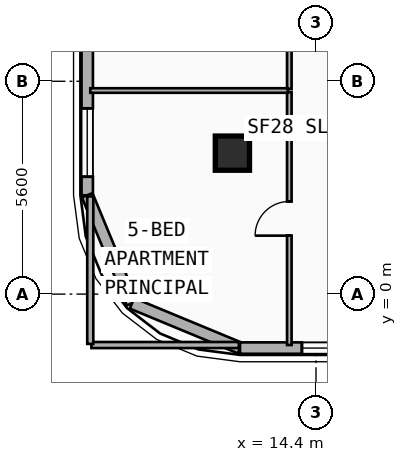
"""IFC4 building model, lengths in metres.
Left out: names, types, materials, properties, quantities, classifications, styles, units other than length and angle.
Written with IfcOpenShell. Run it as: python <this file> out.ifc"""

import sys

from ifc_helpers import new_model, si_unit, direction, frame, frame_2d, origin, origin_2d, place, context, subcontext, project, spatial, rectangle, extrude, element, fill, save


model = new_model("IFC4")
c1 = context("Model", 3, precision=1e-05, world=origin(), true_north=direction((0.0, 1.0)))
c2 = subcontext(c1, "Body", "Model", "MODEL_VIEW")
j1 = project(units=[si_unit("LENGTHUNIT", "METRE"), si_unit("PLANEANGLEUNIT", "RADIAN")], contexts=[c1])
p1 = place(None, origin())
s1 = spatial("IfcSite", under=j1, at=p1, CompositionType="ELEMENT")
p2 = place(p1, origin())
s2 = spatial("IfcBuilding", under=s1, at=p2, CompositionType="ELEMENT")
p3 = place(p2, frame((0.0, 0.0, 247.3)))
s3 = spatial("IfcBuildingStorey", under=s2, at=p3, CompositionType="ELEMENT", Elevation=247.3)
p4 = place(p3, frame((12.2, 3.818, 0.0), z_axis=(0.0, -0.090227632116, 0.995921168769), x_axis=(1.0, 0.0, 0.0)))
e1 = element("IfcColumn", 1, at=p4, inside=s3, PredefinedType="COLUMN", context=c2, shape_type="SweptSolid", body=[
    extrude(rectangle(XDim=0.9, YDim=0.9, at=origin_2d()), origin(), (0.0, 0.0, 1.0), 3.715),
])
p5 = place(p3, frame((8.38, 2.6, 0.0), z_axis=(0.0, 0.0, 1.0), x_axis=(0.0, 1.0, 0.0)))
e2 = element("IfcWall", 2, at=p5, inside=s3, PredefinedType="SOLIDWALL", context=c2, shape_type="SweptSolid", body=[
    extrude(rectangle(XDim=34.2, YDim=0.3, at=frame_2d((17.1, 0.0))), origin(), (0.0, 0.0, 1.0), 3.42),
])
p6 = place(p5, frame((0.489, 0.0, 0.8)))
e3 = element("IfcOpeningElement", 3, at=p6, cuts=e2, PredefinedType="OPENING", context=c2, shape_type="SweptSolid", body=[
    extrude(rectangle(XDim=1.8, YDim=1.8, at=frame_2d((0.9, 0.9))), frame((0.0, 0.16, 0.0), z_axis=(0.0, -1.0, 0.0), x_axis=(1.0, 0.0, 0.0)), (0.0, 0.0, 1.0), 0.32),
])
p7 = place(p5, frame((4.431, 0.0, 0.75)))
e4 = element("IfcOpeningElement", 4, at=p7, cuts=e2, PredefinedType="OPENING", context=c2, shape_type="SweptSolid", body=[
    extrude(rectangle(XDim=2.1, YDim=2.1, at=frame_2d((1.05, 1.05))), frame((0.0, 0.16, 0.0), z_axis=(0.0, -1.0, 0.0), x_axis=(1.0, 0.0, 0.0)), (0.0, 0.0, 1.0), 0.32),
])
p8 = place(p5, frame((9.596, 0.0, 0.75)))
e5 = element("IfcOpeningElement", 5, at=p8, cuts=e2, PredefinedType="OPENING", context=c2, shape_type="SweptSolid", body=[
    extrude(rectangle(XDim=2.1, YDim=2.1, at=frame_2d((1.05, 1.05))), frame((0.0, 0.16, 0.0), z_axis=(0.0, -1.0, 0.0), x_axis=(1.0, 0.0, 0.0)), (0.0, 0.0, 1.0), 0.32),
])
p9 = place(p5, frame((14.478, 0.0, 0.75)))
e6 = element("IfcOpeningElement", 6, at=p9, cuts=e2, PredefinedType="OPENING", context=c2, shape_type="SweptSolid", body=[
    extrude(rectangle(XDim=2.1, YDim=2.1, at=frame_2d((1.05, 1.05))), frame((0.0, 0.16, 0.0), z_axis=(0.0, -1.0, 0.0), x_axis=(1.0, 0.0, 0.0)), (0.0, 0.0, 1.0), 0.32),
])
p10 = place(p5, frame((18.268, 0.0, 0.75)))
e7 = element("IfcOpeningElement", 7, at=p10, cuts=e2, PredefinedType="OPENING", context=c2, shape_type="SweptSolid", body=[
    extrude(rectangle(XDim=2.1, YDim=2.1, at=frame_2d((1.05, 1.05))), frame((0.0, 0.16, 0.0), z_axis=(0.0, -1.0, 0.0), x_axis=(1.0, 0.0, 0.0)), (0.0, 0.0, 1.0), 0.32),
])
p11 = place(p3, frame((9.557, -0.243, 0.0), z_axis=(0.0, 0.0, 1.0), x_axis=(-0.382676475685, 0.923882414032, 0.0)))
e8 = element("IfcWall", 8, at=p11, inside=s3, PredefinedType="SOLIDWALL", context=c2, shape_type="SweptSolid", body=[
    extrude(rectangle(XDim=3.077, YDim=0.3, at=frame_2d((1.539, 0.0))), origin(), (0.0, 0.0, 1.0), 3.42),
])
p12 = place(p3, frame((12.4, -1.42, 0.0), z_axis=(0.0, 0.0, 1.0), x_axis=(-0.92389884758, 0.382636798336, 0.0)))
e9 = element("IfcWall", 9, at=p12, inside=s3, PredefinedType="SOLIDWALL", context=c2, shape_type="SweptSolid", body=[
    extrude(rectangle(XDim=3.077, YDim=0.3, at=frame_2d((1.538, 0.0))), origin(), (0.0, 0.0, 1.0), 3.42),
])
p13 = place(p3, frame((45.2, -1.42, 0.0), z_axis=(0.0, 0.0, 1.0), x_axis=(-1.0, 0.0, 0.0)))
e10 = element("IfcWall", 10, at=p13, inside=s3, PredefinedType="SOLIDWALL", context=c2, shape_type="SweptSolid", body=[
    extrude(rectangle(XDim=32.8, YDim=0.3, at=frame_2d((16.4, 0.0))), origin(), (0.0, 0.0, 1.0), 3.42),
])
p14 = place(p13, frame((29.071, 0.0, 0.75)))
e11 = element("IfcOpeningElement", 11, at=p14, cuts=e10, PredefinedType="OPENING", context=c2, shape_type="SweptSolid", body=[
    extrude(rectangle(XDim=2.1, YDim=2.1, at=frame_2d((1.05, 1.05))), frame((0.0, 0.16, 0.0), z_axis=(0.0, -1.0, 0.0), x_axis=(1.0, 0.0, 0.0)), (0.0, 0.0, 1.0), 0.32),
])
p15 = place(p13, frame((26.745, 0.0, 0.75)))
e12 = element("IfcOpeningElement", 12, at=p15, cuts=e10, PredefinedType="OPENING", context=c2, shape_type="SweptSolid", body=[
    extrude(rectangle(XDim=1.6, YDim=1.95, at=frame_2d((0.8, 0.975))), frame((0.0, 0.16, 0.0), z_axis=(0.0, -1.0, 0.0), x_axis=(1.0, 0.0, 0.0)), (0.0, 0.0, 1.0), 0.32),
])
p16 = place(p13, frame((21.981, 0.0, 0.75)))
e13 = element("IfcOpeningElement", 13, at=p16, cuts=e10, PredefinedType="OPENING", context=c2, shape_type="SweptSolid", body=[
    extrude(rectangle(XDim=2.1, YDim=2.1, at=frame_2d((1.05, 1.05))), frame((0.0, 0.16, 0.0), z_axis=(0.0, -1.0, 0.0), x_axis=(1.0, 0.0, 0.0)), (0.0, 0.0, 1.0), 0.32),
])
p17 = place(p13, frame((18.324, 0.0, 0.75)))
e14 = element("IfcOpeningElement", 14, at=p17, cuts=e10, PredefinedType="OPENING", context=c2, shape_type="SweptSolid", body=[
    extrude(rectangle(XDim=2.1, YDim=2.1, at=frame_2d((1.05, 1.05))), frame((0.0, 0.16, 0.0), z_axis=(0.0, -1.0, 0.0), x_axis=(1.0, 0.0, 0.0)), (0.0, 0.0, 1.0), 0.32),
])
p18 = place(p13, frame((11.364, 0.0, 0.75)))
e15 = element("IfcOpeningElement", 15, at=p18, cuts=e10, PredefinedType="OPENING", context=c2, shape_type="SweptSolid", body=[
    extrude(rectangle(XDim=2.1, YDim=2.1, at=frame_2d((1.05, 1.05))), frame((0.0, 0.16, 0.0), z_axis=(0.0, -1.0, 0.0), x_axis=(1.0, 0.0, 0.0)), (0.0, 0.0, 1.0), 0.32),
])
p19 = place(p13, frame((9.238, 0.0, 0.68)))
e16 = element("IfcOpeningElement", 16, at=p19, cuts=e10, PredefinedType="OPENING", context=c2, shape_type="SweptSolid", body=[
    extrude(rectangle(XDim=1.2, YDim=1.5, at=frame_2d((0.6, 0.75))), frame((0.0, 0.16, 0.0), z_axis=(0.0, -1.0, 0.0), x_axis=(1.0, 0.0, 0.0)), (0.0, 0.0, 1.0), 0.32),
])
p20 = place(p13, frame((14.669, 0.0, 0.75)))
e17 = element("IfcOpeningElement", 17, at=p20, cuts=e10, PredefinedType="OPENING", context=c2, shape_type="SweptSolid", body=[
    extrude(rectangle(XDim=2.1, YDim=2.1, at=frame_2d((1.05, 1.05))), frame((0.0, 0.16, 0.0), z_axis=(0.0, -1.0, 0.0), x_axis=(1.0, 0.0, 0.0)), (0.0, 0.0, 1.0), 0.32),
])
p21 = place(p13, frame((1.937, 0.0, 0.75)))
e18 = element("IfcOpeningElement", 18, at=p21, cuts=e10, PredefinedType="OPENING", context=c2, shape_type="SweptSolid", body=[
    extrude(rectangle(XDim=2.1, YDim=2.1, at=frame_2d((1.05, 1.05))), frame((0.0, 0.16, 0.0), z_axis=(0.0, -1.0, 0.0), x_axis=(1.0, 0.0, 0.0)), (0.0, 0.0, 1.0), 0.32),
])
p22 = place(p13, frame((4.709, 0.0, 0.8)))
e19 = element("IfcOpeningElement", 19, at=p22, cuts=e10, PredefinedType="OPENING", context=c2, shape_type="SweptSolid", body=[
    extrude(rectangle(XDim=1.8, YDim=1.8, at=frame_2d((0.9, 0.9))), frame((0.0, 0.16, 0.0), z_axis=(0.0, -1.0, 0.0), x_axis=(1.0, 0.0, 0.0)), (0.0, 0.0, 1.0), 0.32),
])
p23 = place(p3, frame((13.698, -1.34, 0.0), z_axis=(0.0, 0.0, 1.0), x_axis=(0.0, 1.0, 0.0)))
e20 = element("IfcWall", 20, at=p23, inside=s3, PredefinedType="PARTITIONING", context=c2, shape_type="SweptSolid", body=[
    extrude(rectangle(XDim=6.657, YDim=0.12, at=frame_2d((3.329, 0.0))), origin(), (0.0, 0.0, 1.0), 3.08),
])
p24 = place(p23, frame((2.878, 0.0, 0.0)))
e21 = element("IfcOpeningElement", 21, at=p24, cuts=e20, PredefinedType="OPENING", context=c2, shape_type="SweptSolid", body=[
    extrude(rectangle(XDim=0.9, YDim=2.1, at=frame_2d((0.45, 1.05))), frame((0.0, 0.07, 0.0), z_axis=(0.0, -1.0, 0.0), x_axis=(1.0, 0.0, 0.0)), (0.0, 0.0, 1.0), 0.14),
])
p25 = place(p3, frame((13.698, 5.397, 0.0), z_axis=(0.0, 0.0, 1.0), x_axis=(0.0, 1.0, 0.0)))
e22 = element("IfcWall", 22, at=p25, inside=s3, PredefinedType="PARTITIONING", context=c2, shape_type="SweptSolid", body=[
    extrude(rectangle(XDim=5.369, YDim=0.12, at=frame_2d((2.685, 0.0))), origin(), (0.0, 0.0, 1.0), 3.05),
])
p26 = place(p25, frame((2.235, 0.0, 0.0)))
e23 = element("IfcOpeningElement", 23, at=p26, cuts=e22, PredefinedType="OPENING", context=c2, shape_type="SweptSolid", body=[
    extrude(rectangle(XDim=0.9, YDim=2.1, at=frame_2d((0.45, 1.05))), frame((0.0, 0.07, 0.0), z_axis=(0.0, -1.0, 0.0), x_axis=(1.0, 0.0, 0.0)), (0.0, 0.0, 1.0), 0.14),
])
p27 = place(p3, frame((8.46, 5.357, 0.0), z_axis=(0.0, 0.0, 1.0), x_axis=(1.0, 0.0, 0.0)))
e24 = element("IfcWall", 24, at=p27, inside=s3, PredefinedType="PARTITIONING", context=c2, shape_type="SweptSolid", body=[
    extrude(rectangle(XDim=5.198, YDim=0.12, at=frame_2d((2.599, 0.0))), origin(), (0.0, 0.0, 1.0), 2.7),
])
for number, where, z_axis, x_axis in (
    (25, (8.49, -1.34, 0.0), (0.0, 0.0, 1.0), (1.0, 0.0, 0.0)),
    (26, (8.46, -1.31, 0.0), (0.0, 0.0, 1.0), (0.0, 1.0, 0.0)),
):
    element("IfcWall", number, at=place(p3, frame(where, z_axis=z_axis, x_axis=x_axis)), inside=s3, PredefinedType="PARTITIONING", context=c2, shape_type="SweptSolid", body=[
        extrude(rectangle(XDim=3.88, YDim=0.16, at=frame_2d((1.94, 0.0))), origin(), (0.0, 0.0, 1.0), 3.42),
    ])
p28 = place(p6, origin())
e27 = element("IfcWindow", 27, at=p28, inside=s3, PartitioningType="SINGLE_PANEL", PredefinedType="WINDOW", context=c2, shape_type="SweptSolid", body=[
    extrude(rectangle(XDim=1.8, YDim=1.8, at=frame_2d((0.9, 0.9))), frame((0.0, 0.03, 0.0), z_axis=(0.0, -1.0, 0.0), x_axis=(1.0, 0.0, 0.0)), (0.0, 0.0, 1.0), 0.06),
])
fill(e3, e27)
p29 = place(p14, origin())
e28 = element("IfcWindow", 28, at=p29, inside=s3, PartitioningType="SINGLE_PANEL", PredefinedType="WINDOW", context=c2, shape_type="SweptSolid", body=[
    extrude(rectangle(XDim=2.1, YDim=2.1, at=frame_2d((1.05, 1.05))), frame((0.0, 0.03, 0.0), z_axis=(0.0, -1.0, 0.0), x_axis=(1.0, 0.0, 0.0)), (0.0, 0.0, 1.0), 0.06),
])
fill(e11, e28)
p30 = place(p24, origin())
e29 = element("IfcDoor", 29, at=p30, inside=s3, OperationType="SINGLE_SWING_LEFT", PredefinedType="DOOR", context=c2, shape_type="SweptSolid", body=[
    extrude(rectangle(XDim=0.9, YDim=2.1, at=frame_2d((0.45, 1.05))), frame((0.0, 0.025, 0.0), z_axis=(0.0, -1.0, 0.0), x_axis=(1.0, 0.0, 0.0)), (0.0, 0.0, 1.0), 0.05),
])
fill(e21, e29)
save(model, sys.argv[1])
